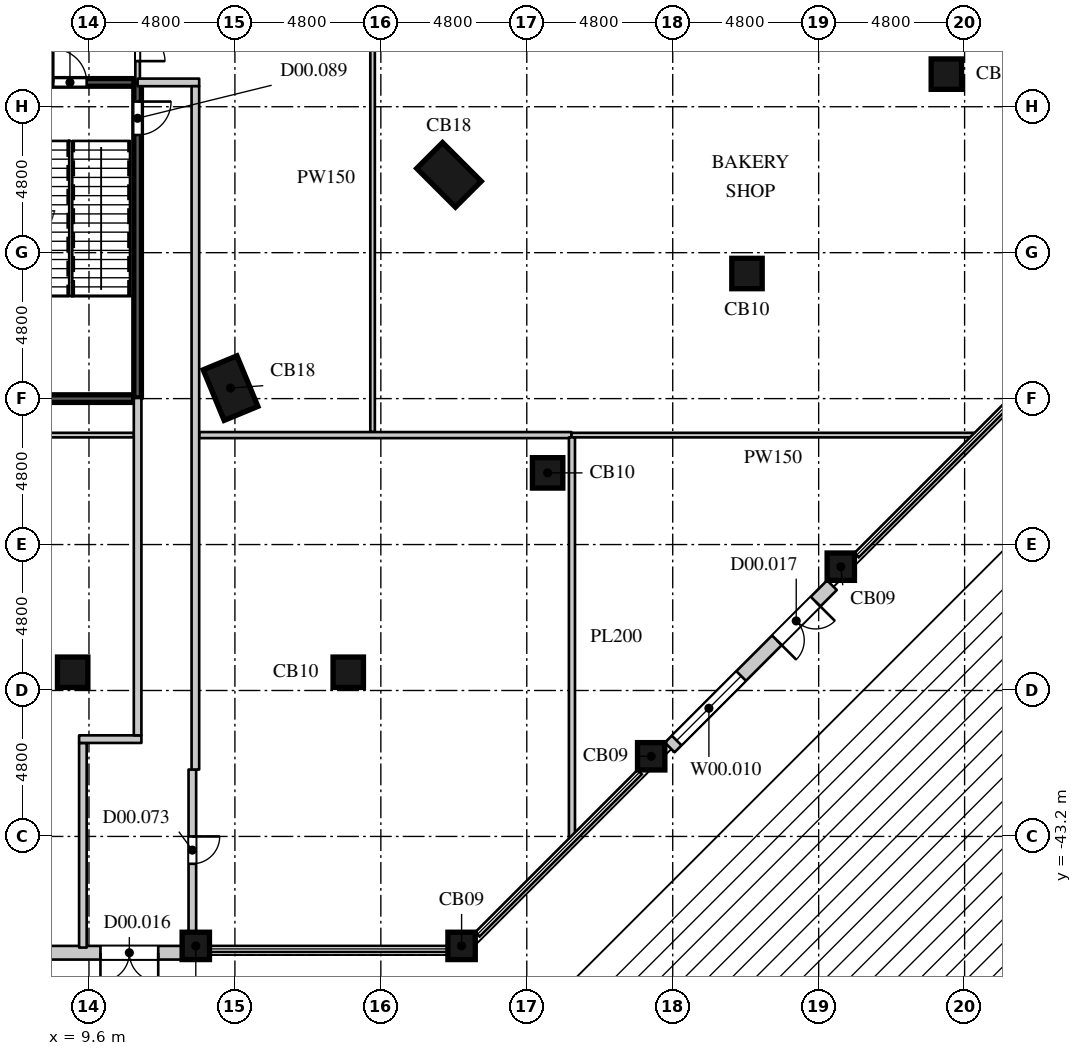
"""IFC4 building model, lengths in metres.
Left out: names, types, materials, properties, quantities, classifications, styles, units other than length and angle.
Written with IfcOpenShell. Run it as: python <this file> out.ifc"""

import sys

from ifc_helpers import new_model, si_unit, direction, frame, frame_2d, origin, origin_2d, place, context, subcontext, project, spatial, rectangle, extrude, element, fill, save


model = new_model("IFC4")
c1 = context("Model", 3, precision=1e-05, world=origin(), true_north=direction((0.0, 1.0)))
c2 = subcontext(c1, "Body", "Model", "MODEL_VIEW")
j1 = project(units=[si_unit("LENGTHUNIT", "METRE"), si_unit("PLANEANGLEUNIT", "RADIAN")], contexts=[c1])
p1 = place(None, origin())
s1 = spatial("IfcSite", under=j1, at=p1, CompositionType="ELEMENT")
p2 = place(p1, origin())
s2 = spatial("IfcBuilding", under=s1, at=p2, CompositionType="ELEMENT")
p3 = place(p2, origin())
s3 = spatial("IfcBuildingStorey", under=s2, at=p3, CompositionType="ELEMENT", Elevation=0.0)
for number, where, z_axis, x_axis in (
    (1, (13.114, -46.8, 0.0), (0.0, 0.0, 1.0), (1.0, 0.0, 0.0)),
    (2, (21.856, -46.8, 0.0), (0.0, 0.0, 1.0), (1.0, 0.0, 0.0)),
    (3, (28.092, -40.564, 0.0), (0.0, 0.0, 1.0), (1.0, 0.0, 0.0)),
):
    element("IfcColumn", number, at=place(p3, frame(where, z_axis=z_axis, x_axis=x_axis)), inside=s3, PredefinedType="COLUMN", context=c2, shape_type="SweptSolid", body=[
        extrude(rectangle(XDim=0.9, YDim=0.9, at=origin_2d()), origin(), (0.0, 0.0, 1.0), 6.0),
    ])
for number, where, z_axis, x_axis in (
    (4, (9.064, -37.8, 0.0), (0.0, 0.0, 1.0), (1.0, 0.0, 0.0)),
    (5, (18.128, -37.8, 0.0), (0.0, 0.0, 1.0), (1.0, 0.0, 0.0)),
):
    element("IfcColumn", number, at=place(p3, frame(where, z_axis=z_axis, x_axis=x_axis)), inside=s3, PredefinedType="COLUMN", context=c2, shape_type="SweptSolid", body=[
        extrude(rectangle(XDim=1.0, YDim=1.0, at=origin_2d()), origin(), (0.0, 0.0, 1.0), 6.0),
    ])
p4 = place(p3, frame((34.328, -34.328, 0.0), z_axis=(0.0, 0.0, 1.0), x_axis=(1.0, 0.0, 0.0)))
e6 = element("IfcColumn", 6, at=p4, inside=s3, PredefinedType="COLUMN", context=c2, shape_type="SweptSolid", body=[
    extrude(rectangle(XDim=0.9, YDim=0.9, at=origin_2d()), origin(), (0.0, 0.0, 1.0), 6.0),
])
p5 = place(p3, frame((24.685, -31.243, 0.0), z_axis=(0.0, 0.0, 1.0), x_axis=(1.0, 0.0, 0.0)))
e7 = element("IfcColumn", 7, at=p5, inside=s3, PredefinedType="COLUMN", context=c2, shape_type="SweptSolid", body=[
    extrude(rectangle(XDim=1.0, YDim=1.0, at=origin_2d()), origin(), (0.0, 0.0, 1.0), 6.0),
])
p6 = place(p3, frame((14.257, -28.454, 0.0), z_axis=(0.0, 0.0, 1.0), x_axis=(0.923879505795, 0.382683496864, 0.0)))
e8 = element("IfcColumn", 8, at=p6, inside=s3, PredefinedType="COLUMN", context=c2, shape_type="SweptSolid", body=[
    extrude(rectangle(XDim=1.2, YDim=1.8, at=origin_2d()), origin(), (0.0, 0.0, 1.0), 6.0),
])
p7 = place(p3, frame((31.243, -24.685, 0.0), z_axis=(0.0, 0.0, 1.0), x_axis=(1.0, 0.0, 0.0)))
e9 = element("IfcColumn", 9, at=p7, inside=s3, PredefinedType="COLUMN", context=c2, shape_type="SweptSolid", body=[
    extrude(rectangle(XDim=1.0, YDim=1.0, at=origin_2d()), origin(), (0.0, 0.0, 1.0), 6.0),
])
p8 = place(p3, frame((21.441, -21.441, 0.0), z_axis=(0.0, 0.0, 1.0), x_axis=(0.707106781187, 0.707106781187, 0.0)))
e10 = element("IfcColumn", 10, at=p8, inside=s3, PredefinedType="COLUMN", context=c2, shape_type="SweptSolid", body=[
    extrude(rectangle(XDim=1.2, YDim=1.8, at=origin_2d()), origin(), (0.0, 0.0, 1.0), 6.0),
])
p9 = place(p3, frame((37.8, -18.128, 0.0), z_axis=(0.0, 0.0, 1.0), x_axis=(1.0, 0.0, 0.0)))
e11 = element("IfcColumn", 11, at=p9, inside=s3, PredefinedType="COLUMN", context=c2, shape_type="SweptSolid", body=[
    extrude(rectangle(XDim=1.0, YDim=1.0, at=origin_2d()), origin(), (0.0, 0.0, 1.0), 6.0),
])
p10 = place(p3, frame((4.821, -47.025, 0.0), z_axis=(0.0, 0.0, 1.0), x_axis=(1.0, 0.0, 0.0)))
e12 = element("IfcWall", 12, at=p10, inside=s3, PredefinedType="ELEMENTEDWALL", context=c2, shape_type="SweptSolid", body=[
    extrude(rectangle(XDim=7.842, YDim=0.45, at=frame_2d((3.921, 0.0))), origin(), (0.0, 0.0, 1.0), 4.8),
])
p11 = place(p10, frame((0.471, 0.0, 1.05)))
e13 = element("IfcOpeningElement", 13, at=p11, cuts=e12, PredefinedType="OPENING", context=c2, shape_type="SweptSolid", body=[
    extrude(rectangle(XDim=3.0, YDim=2.7, at=frame_2d((1.5, 1.35))), frame((0.0, 0.235, 0.0), z_axis=(0.0, -1.0, 0.0), x_axis=(1.0, 0.0, 0.0)), (0.0, 0.0, 1.0), 0.47),
])
p12 = place(p10, frame((5.157, 0.0, 0.0)))
e14 = element("IfcOpeningElement", 14, at=p12, cuts=e12, PredefinedType="OPENING", context=c2, shape_type="SweptSolid", body=[
    extrude(rectangle(XDim=1.9, YDim=2.7, at=frame_2d((0.95, 1.35))), frame((0.0, 0.235, 0.0), z_axis=(0.0, -1.0, 0.0), x_axis=(1.0, 0.0, 0.0)), (0.0, 0.0, 1.0), 0.47),
])
p13 = place(p3, frame((28.701, -40.273, 0.0), z_axis=(0.0, 0.0, 1.0), x_axis=(0.707122957123, 0.70709060488, 0.0)))
e15 = element("IfcWall", 15, at=p13, inside=s3, PredefinedType="ELEMENTEDWALL", context=c2, shape_type="SweptSolid", body=[
    extrude(rectangle(XDim=7.546, YDim=0.45, at=frame_2d((3.773, 0.0))), origin(), (0.0, 0.0, 1.0), 4.8),
])
p14 = place(p13, frame((0.323, 0.0, 1.05)))
e16 = element("IfcOpeningElement", 16, at=p14, cuts=e15, PredefinedType="OPENING", context=c2, shape_type="SweptSolid", body=[
    extrude(rectangle(XDim=3.0, YDim=2.7, at=frame_2d((1.5, 1.35))), frame((0.0, 0.235, 0.0), z_axis=(0.0, -1.0, 0.0), x_axis=(1.0, 0.0, 0.0)), (0.0, 0.0, 1.0), 0.47),
])
p15 = place(p13, frame((4.985, 0.0, 0.0)))
e17 = element("IfcOpeningElement", 17, at=p15, cuts=e15, PredefinedType="OPENING", context=c2, shape_type="SweptSolid", body=[
    extrude(rectangle(XDim=1.8, YDim=2.7, at=frame_2d((0.9, 1.35))), frame((0.0, 0.235, 0.0), z_axis=(0.0, -1.0, 0.0), x_axis=(1.0, 0.0, 0.0)), (0.0, 0.0, 1.0), 0.47),
])
p16 = place(p3, frame((2.38, -30.0, 0.0), z_axis=(0.0, 0.0, 1.0), x_axis=(1.0, 0.0, 0.0)))
e18 = element("IfcWall", 18, at=p16, inside=s3, PredefinedType="PARTITIONING", context=c2, shape_type="SweptSolid", body=[
    extrude(rectangle(XDim=8.695, YDim=0.15, at=frame_2d((4.348, 0.0))), origin(), (0.0, 0.0, 1.0), 5.65),
])
p17 = place(p3, frame((11.2, -18.4, 0.0), z_axis=(0.0, 0.0, 1.0), x_axis=(0.0, 1.0, 0.0)))
e19 = element("IfcWall", 19, at=p17, inside=s3, PredefinedType="PARTITIONING", context=c2, shape_type="SweptSolid", body=[
    extrude(rectangle(XDim=2.325, YDim=0.15, at=frame_2d((1.163, 0.0))), origin(), (0.0, 0.0, 1.0), 5.65),
])
p18 = place(p17, frame((0.7, 0.0, 0.0)))
e20 = element("IfcOpeningElement", 20, at=p18, cuts=e19, PredefinedType="OPENING", context=c2, shape_type="SweptSolid", body=[
    extrude(rectangle(XDim=0.9, YDim=2.2, at=frame_2d((0.45, 1.1))), frame((0.0, 0.085, 0.0), z_axis=(0.0, -1.0, 0.0), x_axis=(1.0, 0.0, 0.0)), (0.0, 0.0, 1.0), 0.17),
])
p19 = place(p3, frame((18.928, -29.9, 0.0), z_axis=(0.0, 0.0, 1.0), x_axis=(0.0, 1.0, 0.0)))
e21 = element("IfcWall", 21, at=p19, inside=s3, PredefinedType="PARTITIONING", context=c2, shape_type="SweptSolid", body=[
    extrude(rectangle(XDim=16.675, YDim=0.15, at=frame_2d((8.337, 0.0))), origin(), (0.0, 0.0, 1.0), 5.65),
])
p20 = place(p3, frame((25.465, -30.0, 0.0), z_axis=(0.0, 0.0, 1.0), x_axis=(1.0, 0.0, 0.0)))
e22 = element("IfcWall", 22, at=p20, inside=s3, PredefinedType="PARTITIONING", context=c2, shape_type="SweptSolid", body=[
    extrude(rectangle(XDim=13.268, YDim=0.15, at=frame_2d((6.634, 0.0))), origin(), (0.0, 0.0, 1.0), 5.65),
])
p21 = place(p3, frame((13.225, -30.0, 0.0), z_axis=(0.0, 0.0, 1.0), x_axis=(1.0, 0.0, 0.0)))
e23 = element("IfcWall", 23, at=p21, inside=s3, PredefinedType="PARTITIONING", context=c2, shape_type="SweptSolid", body=[
    extrude(rectangle(XDim=12.24, YDim=0.2, at=frame_2d((6.12, 0.0))), origin(), (0.0, 0.0, 1.0), 5.65),
])
p22 = place(p3, frame((25.485, -43.248, 0.0), z_axis=(0.0, 0.0, 1.0), x_axis=(0.0, 1.0, 0.0)))
e24 = element("IfcWall", 24, at=p22, inside=s3, PredefinedType="PARTITIONING", context=c2, shape_type="SweptSolid", body=[
    extrude(rectangle(XDim=13.173, YDim=0.2, at=frame_2d((6.587, 0.0))), origin(), (0.0, 0.0, 1.0), 5.65),
])
p23 = place(p3, frame((6.675, -28.8, 0.0), z_axis=(0.0, 0.0, 1.0), x_axis=(1.0, 0.0, 0.0)))
e25 = element("IfcWall", 25, at=p23, inside=s3, PredefinedType="SHEAR", context=c2, shape_type="SweptSolid", body=[
    extrude(rectangle(XDim=4.4, YDim=0.25, at=frame_2d((2.2, 0.0))), origin(), (0.0, 0.0, 1.0), 5.65),
])
p24 = place(p3, frame((6.925, -18.4, 0.0), z_axis=(0.0, 0.0, 1.0), x_axis=(1.0, 0.0, 0.0)))
e26 = element("IfcWall", 26, at=p24, inside=s3, PredefinedType="SHEAR", context=c2, shape_type="SweptSolid", body=[
    extrude(rectangle(XDim=4.275, YDim=0.25, at=frame_2d((2.137, 0.0))), origin(), (0.0, 0.0, 1.0), 5.65),
])
p25 = place(p24, frame((1.5, 0.0, 0.0)))
e27 = element("IfcOpeningElement", 27, at=p25, cuts=e26, PredefinedType="OPENING", context=c2, shape_type="SweptSolid", body=[
    extrude(rectangle(XDim=1.1, YDim=2.2, at=frame_2d((0.55, 1.1))), frame((0.0, 0.135, 0.0), z_axis=(0.0, -1.0, 0.0), x_axis=(1.0, 0.0, 0.0)), (0.0, 0.0, 1.0), 0.27),
])
p26 = place(p3, frame((11.2, -28.78, 0.0), z_axis=(0.0, 0.0, 1.0), x_axis=(0.0, 1.0, 0.0)))
e28 = element("IfcWall", 28, at=p26, inside=s3, PredefinedType="SHEAR", context=c2, shape_type="SweptSolid", body=[
    extrude(rectangle(XDim=10.38, YDim=0.25, at=frame_2d((5.19, 0.0))), origin(), (0.0, 0.0, 1.0), 5.65),
])
p27 = place(p26, frame((8.65, 0.0, 0.0)))
e29 = element("IfcOpeningElement", 29, at=p27, cuts=e28, PredefinedType="OPENING", context=c2, shape_type="SweptSolid", body=[
    extrude(rectangle(XDim=1.1, YDim=2.2, at=frame_2d((0.55, 1.1))), frame((0.0, 0.135, 0.0), z_axis=(0.0, -1.0, 0.0), x_axis=(1.0, 0.0, 0.0)), (0.0, 0.0, 1.0), 0.27),
])
p28 = place(p3, frame((9.4, -46.855, 0.0), z_axis=(0.0, 0.0, 1.0), x_axis=(0.0, 1.0, 0.0)))
e30 = element("IfcWall", 30, at=p28, inside=s3, PredefinedType="PARTITIONING", context=c2, shape_type="SweptSolid", body=[
    extrude(rectangle(XDim=6.73, YDim=0.25, at=frame_2d((3.365, 0.0))), origin(), (0.0, 0.0, 1.0), 5.65),
])
p29 = place(p3, frame((9.275, -40.0, 0.0), z_axis=(0.0, 0.0, 1.0), x_axis=(1.0, 0.0, 0.0)))
e31 = element("IfcWall", 31, at=p29, inside=s3, PredefinedType="PARTITIONING", context=c2, shape_type="SweptSolid", body=[
    extrude(rectangle(XDim=2.05, YDim=0.25, at=frame_2d((1.025, 0.0))), origin(), (0.0, 0.0, 1.0), 5.65),
])
p30 = place(p3, frame((11.2, -39.875, 0.0), z_axis=(0.0, 0.0, 1.0), x_axis=(0.0, 1.0, 0.0)))
e32 = element("IfcWall", 32, at=p30, inside=s3, PredefinedType="PARTITIONING", context=c2, shape_type="SweptSolid", body=[
    extrude(rectangle(XDim=11.095, YDim=0.25, at=frame_2d((5.547, 0.0))), origin(), (0.0, 0.0, 1.0), 5.65),
])
p31 = place(p3, frame((11.2, -18.4, 0.0), z_axis=(0.0, 0.0, 1.0), x_axis=(1.0, 0.0, 0.0)))
e33 = element("IfcWall", 33, at=p31, inside=s3, PredefinedType="PARTITIONING", context=c2, shape_type="SweptSolid", body=[
    extrude(rectangle(XDim=2.025, YDim=0.25, at=frame_2d((1.013, 0.0))), origin(), (0.0, 0.0, 1.0), 5.65),
])
p32 = place(p3, frame((13.0, -46.35, 0.0), z_axis=(0.0, 0.0, 1.0), x_axis=(0.0, 1.0, 0.0)))
e34 = element("IfcWall", 34, at=p32, inside=s3, PredefinedType="PARTITIONING", context=c2, shape_type="SweptSolid", body=[
    extrude(rectangle(XDim=5.35, YDim=0.25, at=frame_2d((2.675, 0.0))), origin(), (0.0, 0.0, 1.0), 5.65),
])
p33 = place(p32, frame((2.25, 0.0, 0.0)))
e35 = element("IfcOpeningElement", 35, at=p33, cuts=e34, PredefinedType="OPENING", context=c2, shape_type="SweptSolid", body=[
    extrude(rectangle(XDim=0.9, YDim=2.2, at=frame_2d((0.45, 1.1))), frame((0.0, 0.135, 0.0), z_axis=(0.0, -1.0, 0.0), x_axis=(1.0, 0.0, 0.0)), (0.0, 0.0, 1.0), 0.27),
])
p34 = place(p3, frame((13.1, -41.0, 0.0), z_axis=(0.0, 0.0, 1.0), x_axis=(0.0, 1.0, 0.0)))
e36 = element("IfcWall", 36, at=p34, inside=s3, PredefinedType="PARTITIONING", context=c2, shape_type="SweptSolid", body=[
    extrude(rectangle(XDim=22.475, YDim=0.25, at=frame_2d((11.238, 0.0))), origin(), (0.0, 0.0, 1.0), 5.65),
])
p35 = place(p12, frame((1.9, 0.0, 0.0), z_axis=(0.0, 0.0, 1.0), x_axis=(-1.0, 0.0, 0.0)))
e37 = element("IfcDoor", 37, at=p35, inside=s3, OperationType="DOUBLE_DOOR_SINGLE_SWING", PredefinedType="DOOR", context=c2, shape_type="SweptSolid", body=[
    extrude(rectangle(XDim=1.9, YDim=2.7, at=frame_2d((0.95, 1.35))), frame((0.0, -0.08, 0.0), z_axis=(0.0, -1.0, 0.0), x_axis=(1.0, 0.0, 0.0)), (0.0, 0.0, 1.0), 0.05),
])
fill(e14, e37)
p36 = place(p14, origin())
e38 = element("IfcWindow", 38, at=p36, inside=s3, PartitioningType="SINGLE_PANEL", PredefinedType="WINDOW", context=c2, shape_type="SweptSolid", body=[
    extrude(rectangle(XDim=3.0, YDim=2.7, at=frame_2d((1.5, 1.35))), frame((0.0, 0.135, 0.0), z_axis=(0.0, -1.0, 0.0), x_axis=(1.0, 0.0, 0.0)), (0.0, 0.0, 1.0), 0.06),
])
fill(e16, e38)
p37 = place(p15, frame((1.8, 0.0, 0.0), z_axis=(0.0, 0.0, 1.0), x_axis=(-1.0, 0.0, 0.0)))
e39 = element("IfcDoor", 39, at=p37, inside=s3, OperationType="DOUBLE_DOOR_SINGLE_SWING", PredefinedType="DOOR", context=c2, shape_type="SweptSolid", body=[
    extrude(rectangle(XDim=1.8, YDim=2.7, at=frame_2d((0.9, 1.35))), frame((0.0, -0.08, 0.0), z_axis=(0.0, -1.0, 0.0), x_axis=(1.0, 0.0, 0.0)), (0.0, 0.0, 1.0), 0.05),
])
fill(e17, e39)
p38 = place(p18, origin())
e40 = element("IfcDoor", 40, at=p38, inside=s3, OperationType="SINGLE_SWING_RIGHT", PredefinedType="DOOR", context=c2, shape_type="SweptSolid", body=[
    extrude(rectangle(XDim=0.9, YDim=2.2, at=frame_2d((0.45, 1.1))), frame((0.0, 0.025, 0.0), z_axis=(0.0, -1.0, 0.0), x_axis=(1.0, 0.0, 0.0)), (0.0, 0.0, 1.0), 0.05),
])
fill(e20, e40)
p39 = place(p33, origin())
e41 = element("IfcDoor", 41, at=p39, inside=s3, OperationType="SINGLE_SWING_LEFT", PredefinedType="DOOR", context=c2, shape_type="SweptSolid", body=[
    extrude(rectangle(XDim=0.9, YDim=2.2, at=frame_2d((0.45, 1.1))), frame((0.0, 0.025, 0.0), z_axis=(0.0, -1.0, 0.0), x_axis=(1.0, 0.0, 0.0)), (0.0, 0.0, 1.0), 0.05),
])
fill(e35, e41)
p40 = place(p25, origin())
e42 = element("IfcDoor", 42, at=p40, inside=s3, OperationType="SINGLE_SWING_LEFT", PredefinedType="DOOR", context=c2, shape_type="SweptSolid", body=[
    extrude(rectangle(XDim=1.1, YDim=2.2, at=frame_2d((0.55, 1.1))), frame((0.0, 0.025, 0.0), z_axis=(0.0, -1.0, 0.0), x_axis=(1.0, 0.0, 0.0)), (0.0, 0.0, 1.0), 0.05),
])
fill(e27, e42)
p41 = place(p27, origin())
e43 = element("IfcDoor", 43, at=p41, inside=s3, OperationType="SINGLE_SWING_LEFT", PredefinedType="DOOR", context=c2, shape_type="SweptSolid", body=[
    extrude(rectangle(XDim=1.1, YDim=2.2, at=frame_2d((0.55, 1.1))), frame((0.0, 0.025, 0.0), z_axis=(0.0, -1.0, 0.0), x_axis=(1.0, 0.0, 0.0)), (0.0, 0.0, 1.0), 0.05),
])
fill(e29, e43)
save(model, sys.argv[1])
